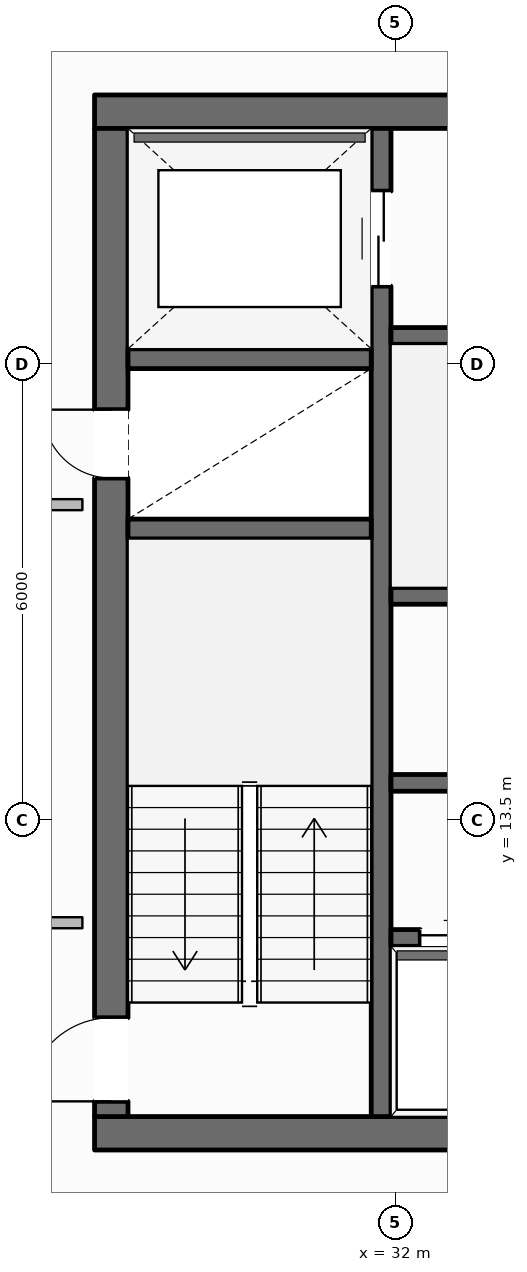
"""IFC4 building model, lengths in metres.
Left out: names, types, materials, properties, quantities, classifications, styles, units other than length and angle.
Written with IfcOpenShell. Run it as: python <this file> out.ifc"""

import sys

from ifc_helpers import new_model, si_unit, direction, frame, frame_2d, origin, place, context, subcontext, project, spatial, rectangle, extrude, element, fill, save


model = new_model("IFC4")
c1 = context("Model", 3, precision=1e-05, world=origin(), true_north=direction((0.0, 1.0)))
c2 = subcontext(c1, "Body", "Model", "MODEL_VIEW")
j1 = project(units=[si_unit("LENGTHUNIT", "METRE"), si_unit("PLANEANGLEUNIT", "RADIAN")], contexts=[c1])
p1 = place(None, origin())
s1 = spatial("IfcSite", under=j1, at=p1, CompositionType="ELEMENT")
p2 = place(p1, origin())
s2 = spatial("IfcBuilding", under=s1, at=p2, CompositionType="ELEMENT")
p3 = place(p2, frame((0.0, 0.0, 207.35)))
s3 = spatial("IfcBuildingStorey", under=s2, at=p3, CompositionType="ELEMENT", Elevation=207.35)
p4 = place(p3, frame((28.04, 9.38, 0.0), z_axis=(0.0, 0.0, 1.0), x_axis=(1.0, 0.0, 0.0)))
e1 = element("IfcWall", 1, at=p4, inside=s3, PredefinedType="SOLIDWALL", context=c2, shape_type="SweptSolid", body=[
    extrude(rectangle(XDim=19.92, YDim=0.44, at=frame_2d((9.96, 0.0))), origin(), (0.0, 0.0, 1.0), 3.6),
])
p5 = place(p4, frame((10.46, 0.0, 0.0)))
e2 = element("IfcOpeningElement", 2, at=p5, cuts=e1, PredefinedType="OPENING", context=c2, shape_type="SweptSolid", body=[
    extrude(rectangle(XDim=1.4, YDim=2.2, at=frame_2d((0.7, 1.1))), frame((0.0, 0.23, 0.0), z_axis=(0.0, -1.0, 0.0), x_axis=(1.0, 0.0, 0.0)), (0.0, 0.0, 1.0), 0.46),
])
p6 = place(p3, frame((28.04, 22.82, 0.0), z_axis=(0.0, 0.0, 1.0), x_axis=(1.0, 0.0, 0.0)))
e3 = element("IfcWall", 3, at=p6, inside=s3, PredefinedType="SOLIDWALL", context=c2, shape_type="SweptSolid", body=[
    extrude(rectangle(XDim=19.92, YDim=0.44, at=frame_2d((9.96, 0.0))), origin(), (0.0, 0.0, 1.0), 3.6),
])
p7 = place(p6, frame((6.235, 0.0, 0.0)))
e4 = element("IfcOpeningElement", 4, at=p7, cuts=e3, PredefinedType="OPENING", context=c2, shape_type="SweptSolid", body=[
    extrude(rectangle(XDim=1.05, YDim=2.15, at=frame_2d((0.525, 1.075))), frame((0.0, 0.23, 0.0), z_axis=(0.0, -1.0, 0.0), x_axis=(1.0, 0.0, 0.0)), (0.0, 0.0, 1.0), 0.46),
])
p8 = place(p6, frame((12.635, 0.0, 0.0)))
e5 = element("IfcOpeningElement", 5, at=p8, cuts=e3, PredefinedType="OPENING", context=c2, shape_type="SweptSolid", body=[
    extrude(rectangle(XDim=1.05, YDim=2.15, at=frame_2d((0.525, 1.075))), frame((0.0, 0.23, 0.0), z_axis=(0.0, -1.0, 0.0), x_axis=(1.0, 0.0, 0.0)), (0.0, 0.0, 1.0), 0.46),
])
p9 = place(p3, frame((28.26, 9.6, 0.0), z_axis=(0.0, 0.0, 1.0), x_axis=(0.0, 1.0, 0.0)))
e6 = element("IfcWall", 6, at=p9, inside=s3, PredefinedType="SOLIDWALL", context=c2, shape_type="SweptSolid", body=[
    extrude(rectangle(XDim=13.0, YDim=0.44, at=frame_2d((6.5, 0.0))), origin(), (0.0, 0.0, 1.0), 3.6),
])
p10 = place(p9, frame((0.2, 0.0, 0.0)))
e7 = element("IfcOpeningElement", 7, at=p10, cuts=e6, PredefinedType="OPENING", context=c2, shape_type="SweptSolid", body=[
    extrude(rectangle(XDim=1.1, YDim=2.15, at=frame_2d((0.55, 1.075))), frame((0.0, 0.23, 0.0), z_axis=(0.0, -1.0, 0.0), x_axis=(1.0, 0.0, 0.0)), (0.0, 0.0, 1.0), 0.46),
])
p11 = place(p9, frame((8.4, 0.0, 0.0)))
e8 = element("IfcOpeningElement", 8, at=p11, cuts=e6, PredefinedType="OPENING", context=c2, shape_type="SweptSolid", body=[
    extrude(rectangle(XDim=0.9, YDim=2.1, at=frame_2d((0.45, 1.05))), frame((0.0, 0.23, 0.0), z_axis=(0.0, -1.0, 0.0), x_axis=(1.0, 0.0, 0.0)), (0.0, 0.0, 1.0), 0.46),
])
p12 = place(p3, frame((31.81, 9.6, 0.0), z_axis=(0.0, 0.0, 1.0), x_axis=(0.0, 1.0, 0.0)))
e9 = element("IfcWall", 9, at=p12, inside=s3, PredefinedType="SHEAR", context=c2, shape_type="SweptSolid", body=[
    extrude(rectangle(XDim=13.0, YDim=0.26, at=frame_2d((6.5, 0.0))), origin(), (0.0, 0.0, 1.0), 3.6),
])
p13 = place(p12, frame((10.925, 0.0, 0.0)))
e10 = element("IfcOpeningElement", 10, at=p13, cuts=e9, PredefinedType="OPENING", context=c2, shape_type="SweptSolid", body=[
    extrude(rectangle(XDim=1.25, YDim=2.25, at=frame_2d((0.625, 1.125))), frame((0.0, 0.14, 0.0), z_axis=(0.0, -1.0, 0.0), x_axis=(1.0, 0.0, 0.0)), (0.0, 0.0, 1.0), 0.28),
])
for number, where, z_axis, x_axis in (
    (11, (28.48, 17.33, 0.0), (0.0, 0.0, 1.0), (1.0, 0.0, 0.0)),
    (12, (28.48, 19.57, 0.0), (0.0, 0.0, 1.0), (1.0, 0.0, 0.0)),
):
    element("IfcWall", number, at=place(p3, frame(where, z_axis=z_axis, x_axis=x_axis)), inside=s3, PredefinedType="SHEAR", context=c2, shape_type="SweptSolid", body=[
        extrude(rectangle(XDim=3.2, YDim=0.26, at=frame_2d((1.6, 0.0))), origin(), (0.0, 0.0, 1.0), 3.6),
    ])
p14 = place(p3, frame((31.94, 19.87, 0.0), z_axis=(0.0, 0.0, 1.0), x_axis=(1.0, 0.0, 0.0)))
e13 = element("IfcWall", 13, at=p14, inside=s3, PredefinedType="SOLIDWALL", context=c2, shape_type="SweptSolid", body=[
    extrude(rectangle(XDim=12.12, YDim=0.22, at=frame_2d((6.06, 0.0))), origin(), (0.0, 0.0, 1.0), 3.6),
])
p15 = place(p14, frame((6.3, 0.0, 0.0)))
e14 = element("IfcOpeningElement", 14, at=p15, cuts=e13, PredefinedType="OPENING", context=c2, shape_type="SweptSolid", body=[
    extrude(rectangle(XDim=1.1, YDim=2.15, at=frame_2d((0.55, 1.075))), frame((0.0, 0.12, 0.0), z_axis=(0.0, -1.0, 0.0), x_axis=(1.0, 0.0, 0.0)), (0.0, 0.0, 1.0), 0.24),
])
p16 = place(p14, frame((8.23, 0.0, 0.0)))
e15 = element("IfcOpeningElement", 15, at=p16, cuts=e13, PredefinedType="OPENING", context=c2, shape_type="SweptSolid", body=[
    extrude(rectangle(XDim=0.9, YDim=2.1, at=frame_2d((0.45, 1.05))), frame((0.0, 0.12, 0.0), z_axis=(0.0, -1.0, 0.0), x_axis=(1.0, 0.0, 0.0)), (0.0, 0.0, 1.0), 0.24),
])
p17 = place(p14, frame((10.45, 0.0, 0.0)))
e16 = element("IfcOpeningElement", 16, at=p17, cuts=e13, PredefinedType="OPENING", context=c2, shape_type="SweptSolid", body=[
    extrude(rectangle(XDim=0.9, YDim=2.1, at=frame_2d((0.45, 1.05))), frame((0.0, 0.12, 0.0), z_axis=(0.0, -1.0, 0.0), x_axis=(1.0, 0.0, 0.0)), (0.0, 0.0, 1.0), 0.24),
])
p18 = place(p3, frame((31.94, 16.45, 0.0), z_axis=(0.0, 0.0, 1.0), x_axis=(1.0, 0.0, 0.0)))
e17 = element("IfcWall", 17, at=p18, inside=s3, PredefinedType="SOLIDWALL", context=c2, shape_type="SweptSolid", body=[
    extrude(rectangle(XDim=12.12, YDim=0.22, at=frame_2d((6.06, 0.0))), origin(), (0.0, 0.0, 1.0), 3.6),
])
p19 = place(p3, frame((31.94, 13.99, 0.0), z_axis=(0.0, 0.0, 1.0), x_axis=(1.0, 0.0, 0.0)))
e18 = element("IfcWall", 18, at=p19, inside=s3, PredefinedType="SOLIDWALL", context=c2, shape_type="SweptSolid", body=[
    extrude(rectangle(XDim=12.12, YDim=0.22, at=frame_2d((6.06, 0.0))), origin(), (0.0, 0.0, 1.0), 3.6),
])
p20 = place(p19, frame((1.11, 0.0, 0.0)))
e19 = element("IfcOpeningElement", 19, at=p20, cuts=e18, PredefinedType="OPENING", context=c2, shape_type="SweptSolid", body=[
    extrude(rectangle(XDim=0.9, YDim=2.1, at=frame_2d((0.45, 1.05))), frame((0.0, 0.12, 0.0), z_axis=(0.0, -1.0, 0.0), x_axis=(1.0, 0.0, 0.0)), (0.0, 0.0, 1.0), 0.24),
])
p21 = place(p19, frame((5.16, 0.0, 0.0)))
e20 = element("IfcOpeningElement", 20, at=p21, cuts=e18, PredefinedType="OPENING", context=c2, shape_type="SweptSolid", body=[
    extrude(rectangle(XDim=0.9, YDim=2.1, at=frame_2d((0.45, 1.05))), frame((0.0, 0.12, 0.0), z_axis=(0.0, -1.0, 0.0), x_axis=(1.0, 0.0, 0.0)), (0.0, 0.0, 1.0), 0.24),
])
p22 = place(p19, frame((9.61, 0.0, 0.0)))
e21 = element("IfcOpeningElement", 21, at=p22, cuts=e18, PredefinedType="OPENING", context=c2, shape_type="SweptSolid", body=[
    extrude(rectangle(XDim=0.9, YDim=2.1, at=frame_2d((0.45, 1.05))), frame((0.0, 0.12, 0.0), z_axis=(0.0, -1.0, 0.0), x_axis=(1.0, 0.0, 0.0)), (0.0, 0.0, 1.0), 0.24),
])
p23 = place(p3, frame((31.94, 11.95, 0.0), z_axis=(0.0, 0.0, 1.0), x_axis=(1.0, 0.0, 0.0)))
e22 = element("IfcWall", 22, at=p23, inside=s3, PredefinedType="SOLIDWALL", context=c2, shape_type="SweptSolid", body=[
    extrude(rectangle(XDim=6.19, YDim=0.22, at=frame_2d((3.095, 0.0))), origin(), (0.0, 0.0, 1.0), 3.6),
])
p24 = place(p23, frame((0.385, 0.0, 0.0)))
e23 = element("IfcOpeningElement", 23, at=p24, cuts=e22, PredefinedType="OPENING", context=c2, shape_type="SweptSolid", body=[
    extrude(rectangle(XDim=1.1, YDim=2.2, at=frame_2d((0.55, 1.1))), frame((0.0, 0.12, 0.0), z_axis=(0.0, -1.0, 0.0), x_axis=(1.0, 0.0, 0.0)), (0.0, 0.0, 1.0), 0.24),
])
p25 = place(p23, frame((2.435, 0.0, 0.0)))
e24 = element("IfcOpeningElement", 24, at=p25, cuts=e22, PredefinedType="OPENING", context=c2, shape_type="SweptSolid", body=[
    extrude(rectangle(XDim=1.1, YDim=2.2, at=frame_2d((0.55, 1.1))), frame((0.0, 0.12, 0.0), z_axis=(0.0, -1.0, 0.0), x_axis=(1.0, 0.0, 0.0)), (0.0, 0.0, 1.0), 0.24),
])
p26 = place(p23, frame((4.485, 0.0, 0.0)))
e25 = element("IfcOpeningElement", 25, at=p26, cuts=e22, PredefinedType="OPENING", context=c2, shape_type="SweptSolid", body=[
    extrude(rectangle(XDim=1.1, YDim=2.2, at=frame_2d((0.55, 1.1))), frame((0.0, 0.12, 0.0), z_axis=(0.0, -1.0, 0.0), x_axis=(1.0, 0.0, 0.0)), (0.0, 0.0, 1.0), 0.24),
])
p27 = place(p3, frame((14.256, 11.0, 0.0), z_axis=(0.0, 0.0, 1.0), x_axis=(0.508231558921, 0.861220461042, 0.0)))
e26 = element("IfcWall", 26, at=p27, inside=s3, PredefinedType="STANDARD", context=c2, shape_type="SweptSolid", body=[
    extrude(rectangle(XDim=38.41, YDim=0.35, at=frame_2d((19.205, 0.0))), origin(), (0.0, 0.0, 1.0), 3.132),
])
p28 = place(p27, frame((34.091, 0.0, 0.65)))
e27 = element("IfcOpeningElement", 27, at=p28, cuts=e26, PredefinedType="OPENING", context=c2, shape_type="SweptSolid", body=[
    extrude(rectangle(XDim=1.45, YDim=1.75, at=frame_2d((0.725, 0.875))), frame((0.0, 0.185, 0.0), z_axis=(0.0, -1.0, 0.0), x_axis=(1.0, 0.0, 0.0)), (0.0, 0.0, 1.0), 0.37),
])
p29 = place(p27, frame((27.848, 0.0, 0.65)))
e28 = element("IfcOpeningElement", 28, at=p29, cuts=e26, PredefinedType="OPENING", context=c2, shape_type="SweptSolid", body=[
    extrude(rectangle(XDim=1.45, YDim=1.75, at=frame_2d((0.725, 0.875))), frame((0.0, 0.185, 0.0), z_axis=(0.0, -1.0, 0.0), x_axis=(1.0, 0.0, 0.0)), (0.0, 0.0, 1.0), 0.37),
])
p30 = place(p27, frame((21.606, 0.0, 0.65)))
e29 = element("IfcOpeningElement", 29, at=p30, cuts=e26, PredefinedType="OPENING", context=c2, shape_type="SweptSolid", body=[
    extrude(rectangle(XDim=1.45, YDim=1.75, at=frame_2d((0.725, 0.875))), frame((0.0, 0.185, 0.0), z_axis=(0.0, -1.0, 0.0), x_axis=(1.0, 0.0, 0.0)), (0.0, 0.0, 1.0), 0.37),
])
p31 = place(p27, frame((9.121, 0.0, 0.65)))
e30 = element("IfcOpeningElement", 30, at=p31, cuts=e26, PredefinedType="OPENING", context=c2, shape_type="SweptSolid", body=[
    extrude(rectangle(XDim=1.45, YDim=1.75, at=frame_2d((0.725, 0.875))), frame((0.0, 0.185, 0.0), z_axis=(0.0, -1.0, 0.0), x_axis=(1.0, 0.0, 0.0)), (0.0, 0.0, 1.0), 0.37),
])
p32 = place(p27, frame((2.878, 0.0, 0.65)))
e31 = element("IfcOpeningElement", 31, at=p32, cuts=e26, PredefinedType="OPENING", context=c2, shape_type="SweptSolid", body=[
    extrude(rectangle(XDim=1.45, YDim=1.75, at=frame_2d((0.725, 0.875))), frame((0.0, 0.185, 0.0), z_axis=(0.0, -1.0, 0.0), x_axis=(1.0, 0.0, 0.0)), (0.0, 0.0, 1.0), 0.37),
])
for number, where, z_axis, x_axis in (
    (32, (27.88, 17.65, 0.0), (0.0, 0.0, 1.0), (-1.0, 0.0, 0.0)),
    (33, (26.06, 12.15, 0.0), (0.0, 0.0, 1.0), (1.0, 0.0, 0.0)),
):
    element("IfcWall", number, at=place(p3, frame(where, z_axis=z_axis, x_axis=x_axis)), inside=s3, PredefinedType="PARTITIONING", context=c2, shape_type="SweptSolid", body=[
        extrude(rectangle(XDim=1.82, YDim=0.145, at=frame_2d((0.91, 0.0))), origin(), (0.0, 0.0, 1.0), 3.6),
    ])
p33 = place(p10, origin())
e34 = element("IfcDoor", 34, at=p33, inside=s3, OperationType="SINGLE_SWING_LEFT", PredefinedType="DOOR", context=c2, shape_type="SweptSolid", body=[
    extrude(rectangle(XDim=1.1, YDim=2.15, at=frame_2d((0.55, 1.075))), frame((0.0, 0.025, 0.0), z_axis=(0.0, -1.0, 0.0), x_axis=(1.0, 0.0, 0.0)), (0.0, 0.0, 1.0), 0.05),
])
fill(e7, e34)
p34 = place(p11, origin())
e35 = element("IfcDoor", 35, at=p34, inside=s3, OperationType="SINGLE_SWING_RIGHT", PredefinedType="DOOR", context=c2, shape_type="SweptSolid", body=[
    extrude(rectangle(XDim=0.9, YDim=2.1, at=frame_2d((0.45, 1.05))), frame((0.0, 0.025, 0.0), z_axis=(0.0, -1.0, 0.0), x_axis=(1.0, 0.0, 0.0)), (0.0, 0.0, 1.0), 0.05),
])
fill(e8, e35)
p35 = place(p13, origin())
e36 = element("IfcDoor", 36, at=p35, inside=s3, OperationType="DOUBLE_DOOR_SLIDING", PredefinedType="DOOR", context=c2, shape_type="SweptSolid", body=[
    extrude(rectangle(XDim=1.25, YDim=2.25, at=frame_2d((0.625, 1.125))), frame((0.0, 0.025, 0.0), z_axis=(0.0, -1.0, 0.0), x_axis=(1.0, 0.0, 0.0)), (0.0, 0.0, 1.0), 0.05),
])
fill(e10, e36)
p36 = place(p24, origin())
e37 = element("IfcDoor", 37, at=p36, inside=s3, OperationType="DOUBLE_DOOR_SLIDING", PredefinedType="DOOR", context=c2, shape_type="SweptSolid", body=[
    extrude(rectangle(XDim=1.1, YDim=2.2, at=frame_2d((0.55, 1.1))), frame((0.0, 0.025, 0.0), z_axis=(0.0, -1.0, 0.0), x_axis=(1.0, 0.0, 0.0)), (0.0, 0.0, 1.0), 0.05),
])
fill(e23, e37)
save(model, sys.argv[1])
